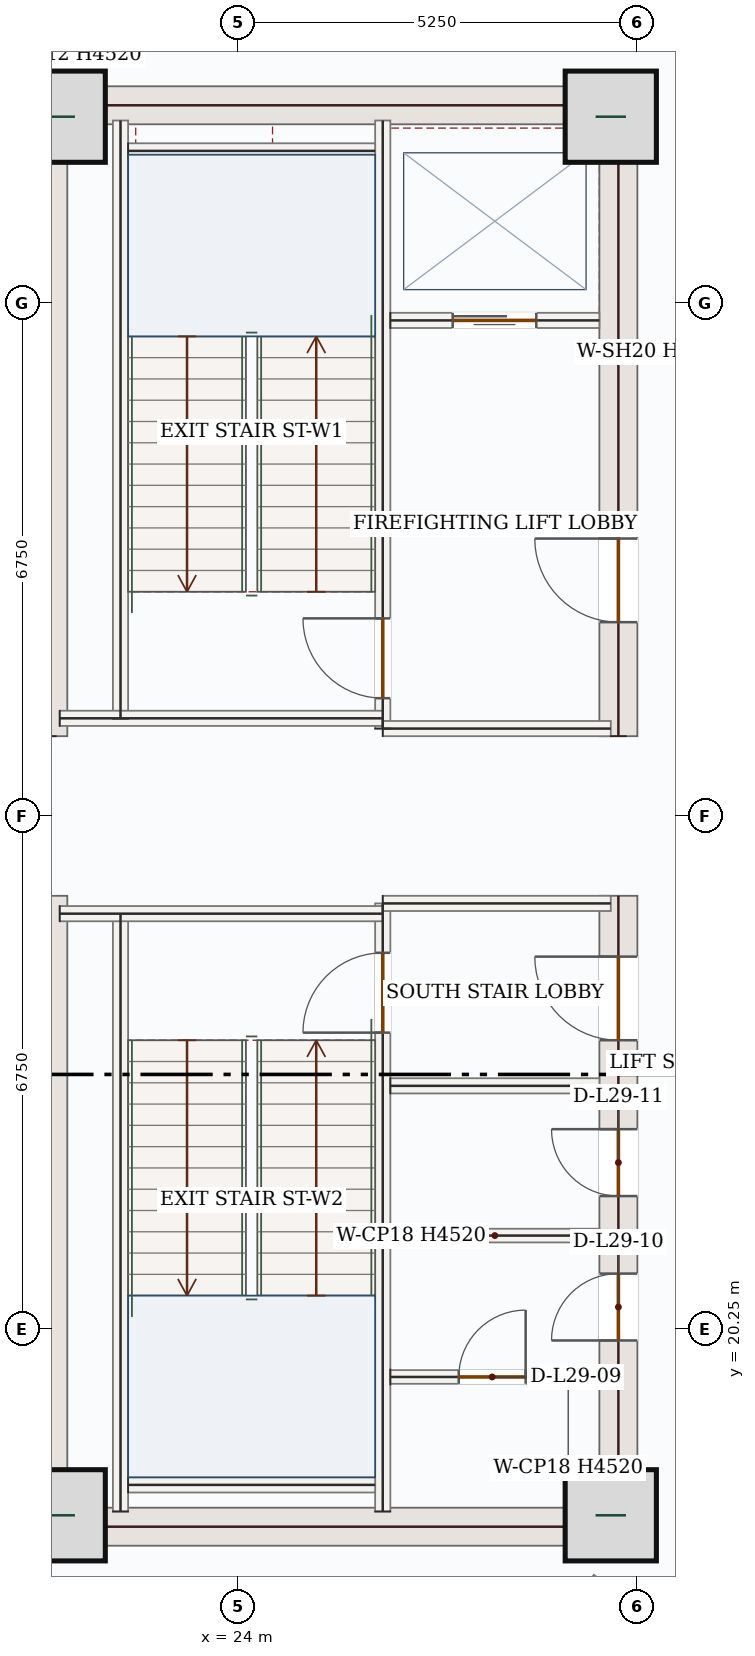
"""IFC4 building model, lengths in metres.
Left out: names, types, materials, properties, quantities, classifications, styles, units other than length and angle.
Written with IfcOpenShell. Run it as: python <this file> out.ifc"""

import sys

from ifc_helpers import new_model, si_unit, direction, frame, frame_2d, origin, origin_2d, place, context, subcontext, project, spatial, rectangle, extrude, source, transform, mapped, element, fill, save


model = new_model("IFC4")
c1 = context("Model", 3, precision=1e-05, world=origin(), true_north=direction((0.0, 1.0)))
c2 = subcontext(c1, "Body", "Model", "MODEL_VIEW")
j1 = project(units=[si_unit("LENGTHUNIT", "METRE"), si_unit("PLANEANGLEUNIT", "RADIAN")], contexts=[c1])
p1 = place(None, origin())
s1 = spatial("IfcSite", under=j1, at=p1, CompositionType="ELEMENT")
p2 = place(p1, origin())
s2 = spatial("IfcBuilding", under=s1, at=p2, CompositionType="ELEMENT")
p3 = place(p2, frame((0.0, 0.0, 130.8)))
s3 = spatial("IfcBuildingStorey", under=s2, at=p3, CompositionType="ELEMENT", Elevation=130.8)
m1 = source(origin(), c2, "Body", "SweptSolid", [
    extrude(rectangle(XDim=8.55, YDim=0.5, at=frame_2d((4.275, 0.0))), origin(), (0.0, 0.0, 1.0), 4.52),
])
for number, where, z_axis, x_axis in (
    (1, (21.5, 17.4, 0.0), (0.0, 0.0, 1.0), (0.0, 1.0, 0.0)),
    (2, (21.5, 28.05, 0.0), (0.0, 0.0, 1.0), (0.0, 1.0, 0.0)),
):
    element("IfcWall", number, at=place(p3, frame(where, z_axis=z_axis, x_axis=x_axis)), inside=s3, PredefinedType="SHEAR", context=c2, shape_type="MappedRepresentation", body=[
        mapped(m1, transform((0.0, 0.0, 0.0), x_axis=(1.0, 0.0, 0.0), y_axis=(0.0, 1.0, 0.0), z_axis=(0.0, 0.0, 1.0), scale=1.0)),
    ])
p4 = place(p3, frame((29.0, 17.4, 0.0), z_axis=(0.0, 0.0, 1.0), x_axis=(0.0, 1.0, 0.0)))
e3 = element("IfcWall", 3, at=p4, inside=s3, PredefinedType="SHEAR", context=c2, shape_type="SweptSolid", body=[
    extrude(rectangle(XDim=8.55, YDim=0.5, at=frame_2d((4.275, 0.0))), origin(), (0.0, 0.0, 1.0), 4.52),
])
p5 = place(p4, frame((6.65, 0.0, 0.0)))
e4 = element("IfcOpeningElement", 4, at=p5, cuts=e3, PredefinedType="OPENING", context=c2, shape_type="SweptSolid", body=[
    extrude(rectangle(XDim=1.1, YDim=2.2, at=frame_2d((0.55, 1.1))), frame((0.0, 0.26, 0.0), z_axis=(0.0, -1.0, 0.0), x_axis=(1.0, 0.0, 0.0)), (0.0, 0.0, 1.0), 0.52),
])
p6 = place(p4, frame((2.7, 0.0, 0.0)))
e5 = element("IfcOpeningElement", 5, at=p6, cuts=e3, PredefinedType="OPENING", context=c2, shape_type="SweptSolid", body=[
    extrude(rectangle(XDim=0.88, YDim=2.1, at=frame_2d((0.44, 1.05))), frame((0.0, 0.26, 0.0), z_axis=(0.0, -1.0, 0.0), x_axis=(1.0, 0.0, 0.0)), (0.0, 0.0, 1.0), 0.52),
])
p7 = place(p4, frame((4.6, 0.0, 0.0)))
e6 = element("IfcOpeningElement", 6, at=p7, cuts=e3, PredefinedType="OPENING", context=c2, shape_type="SweptSolid", body=[
    extrude(rectangle(XDim=0.88, YDim=2.1, at=frame_2d((0.44, 1.05))), frame((0.0, 0.26, 0.0), z_axis=(0.0, -1.0, 0.0), x_axis=(1.0, 0.0, 0.0)), (0.0, 0.0, 1.0), 0.52),
])
p8 = place(p3, frame((29.0, 28.05, 0.0), z_axis=(0.0, 0.0, 1.0), x_axis=(0.0, 1.0, 0.0)))
e7 = element("IfcWall", 7, at=p8, inside=s3, PredefinedType="SHEAR", context=c2, shape_type="SweptSolid", body=[
    extrude(rectangle(XDim=8.55, YDim=0.5, at=frame_2d((4.275, 0.0))), origin(), (0.0, 0.0, 1.0), 4.52),
])
p9 = place(p8, frame((1.5, 0.0, 0.0)))
e8 = element("IfcOpeningElement", 8, at=p9, cuts=e7, PredefinedType="OPENING", context=c2, shape_type="SweptSolid", body=[
    extrude(rectangle(XDim=1.1, YDim=2.2, at=frame_2d((0.55, 1.1))), frame((0.0, 0.26, 0.0), z_axis=(0.0, -1.0, 0.0), x_axis=(1.0, 0.0, 0.0)), (0.0, 0.0, 1.0), 0.52),
])
m2 = source(origin(), c2, "Body", "SweptSolid", [
    extrude(rectangle(XDim=7.0, YDim=0.5, at=frame_2d((3.5, 0.0))), origin(), (0.0, 0.0, 1.0), 4.52),
])
for number, where, z_axis, x_axis in (
    (9, (21.75, 17.65, 0.0), (0.0, 0.0, 1.0), (1.0, 0.0, 0.0)),
    (10, (21.75, 36.35, 0.0), (0.0, 0.0, 1.0), (1.0, 0.0, 0.0)),
):
    element("IfcWall", number, at=place(p3, frame(where, z_axis=z_axis, x_axis=x_axis)), inside=s3, PredefinedType="SHEAR", context=c2, shape_type="MappedRepresentation", body=[
        mapped(m2, transform((0.0, 0.0, 0.0), x_axis=(1.0, 0.0, 0.0), y_axis=(0.0, 1.0, 0.0), z_axis=(0.0, 0.0, 1.0), scale=1.0)),
    ])
m3 = source(origin(), c2, "Body", "SweptSolid", [
    extrude(rectangle(XDim=1.2, YDim=1.2, at=origin_2d()), origin(), (0.0, 0.0, 1.0), 4.8),
])
for number, where, z_axis, x_axis in (
    (11, (21.65, 17.8, 0.0), (0.0, 0.0, 1.0), (1.0, 0.0, 0.0)),
    (12, (28.9, 17.8, 0.0), (0.0, 0.0, 1.0), (1.0, 0.0, 0.0)),
    (13, (21.65, 36.2, 0.0), (0.0, 0.0, 1.0), (1.0, 0.0, 0.0)),
    (14, (28.9, 36.2, 0.0), (0.0, 0.0, 1.0), (1.0, 0.0, 0.0)),
):
    element("IfcColumn", number, at=place(p3, frame(where, z_axis=z_axis, x_axis=x_axis)), inside=s3, PredefinedType="COLUMN", context=c2, shape_type="MappedRepresentation", body=[
        mapped(m3, transform((0.0, 0.0, 0.0), x_axis=(1.0, 0.0, 0.0), y_axis=(0.0, 1.0, 0.0), z_axis=(0.0, 0.0, 1.0), scale=1.0)),
    ])
p10 = place(p3, frame((22.658, 14.74, 0.0), z_axis=(0.0, 0.0, 1.0), x_axis=(-0.707106781187, 0.707106781187, 0.0)))
e15 = element("IfcWall", 15, at=p10, inside=s3, PredefinedType="SOLIDWALL", context=c2, shape_type="SweptSolid", body=[
    extrude(rectangle(XDim=4.11, YDim=0.28, at=frame_2d((2.055, 0.0))), origin(), (0.0, 0.0, 1.0), 4.52),
])
p11 = place(p10, frame((1.155, 0.0, 0.85)))
e16 = element("IfcOpeningElement", 16, at=p11, cuts=e15, PredefinedType="OPENING", context=c2, shape_type="SweptSolid", body=[
    extrude(rectangle(XDim=1.8, YDim=1.75, at=frame_2d((0.9, 0.875))), frame((0.0, 0.15, 0.0), z_axis=(0.0, -1.0, 0.0), x_axis=(1.0, 0.0, 0.0)), (0.0, 0.0, 1.0), 0.3),
])
m4 = source(origin(), c2, "Body", "SweptSolid", [
    extrude(rectangle(XDim=5.258, YDim=0.28, at=frame_2d((2.629, 0.0))), origin(), (0.0, 0.0, 1.0), 4.52),
])
p12 = place(p3, frame((18.94, 35.542, 0.0), z_axis=(0.0, 0.0, 1.0), x_axis=(0.707106781187, 0.707106781187, 0.0)))
e17 = element("IfcWall", 17, at=p12, inside=s3, PredefinedType="SOLIDWALL", context=c2, shape_type="MappedRepresentation", body=[
    mapped(m4, transform((0.0, 0.0, 0.0), x_axis=(1.0, 0.0, 0.0), y_axis=(0.0, 1.0, 0.0), z_axis=(0.0, 0.0, 1.0), scale=1.0)),
])
m5 = source(origin(), c2, "Body", "SweptSolid", [
    extrude(rectangle(XDim=7.87, YDim=0.2, at=frame_2d((3.935, 0.0))), origin(), (0.0, 0.0, 1.0), 4.52),
])
for number, where, z_axis, x_axis in (
    (18, (22.45, 17.85, 0.0), (0.0, 0.0, 1.0), (0.0, 1.0, 0.0)),
    (19, (22.45, 28.28, 0.0), (0.0, 0.0, 1.0), (0.0, 1.0, 0.0)),
):
    element("IfcWall", number, at=place(p3, frame(where, z_axis=z_axis, x_axis=x_axis)), inside=s3, PredefinedType="SOLIDWALL", context=c2, shape_type="MappedRepresentation", body=[
        mapped(m5, transform((0.0, 0.0, 0.0), x_axis=(1.0, 0.0, 0.0), y_axis=(0.0, 1.0, 0.0), z_axis=(0.0, 0.0, 1.0), scale=1.0)),
    ])
p13 = place(p3, frame((25.9, 17.85, 0.0), z_axis=(0.0, 0.0, 1.0), x_axis=(0.0, 1.0, 0.0)))
e20 = element("IfcWall", 20, at=p13, inside=s3, PredefinedType="SOLIDWALL", context=c2, shape_type="SweptSolid", body=[
    extrude(rectangle(XDim=8.0, YDim=0.2, at=frame_2d((4.0, 0.0))), origin(), (0.0, 0.0, 1.0), 4.52),
])
p14 = place(p13, frame((6.3, 0.0, 0.0)))
e21 = element("IfcOpeningElement", 21, at=p14, cuts=e20, PredefinedType="OPENING", context=c2, shape_type="SweptSolid", body=[
    extrude(rectangle(XDim=1.05, YDim=2.15, at=frame_2d((0.525, 1.075))), frame((0.0, 0.11, 0.0), z_axis=(0.0, -1.0, 0.0), x_axis=(1.0, 0.0, 0.0)), (0.0, 0.0, 1.0), 0.22),
])
p15 = place(p3, frame((25.9, 28.15, 0.0), z_axis=(0.0, 0.0, 1.0), x_axis=(0.0, 1.0, 0.0)))
e22 = element("IfcWall", 22, at=p15, inside=s3, PredefinedType="SOLIDWALL", context=c2, shape_type="SweptSolid", body=[
    extrude(rectangle(XDim=8.0, YDim=0.2, at=frame_2d((4.0, 0.0))), origin(), (0.0, 0.0, 1.0), 4.52),
])
p16 = place(p15, frame((0.4, 0.0, 0.0)))
e23 = element("IfcOpeningElement", 23, at=p16, cuts=e22, PredefinedType="OPENING", context=c2, shape_type="SweptSolid", body=[
    extrude(rectangle(XDim=1.05, YDim=2.15, at=frame_2d((0.525, 1.075))), frame((0.0, 0.11, 0.0), z_axis=(0.0, -1.0, 0.0), x_axis=(1.0, 0.0, 0.0)), (0.0, 0.0, 1.0), 0.22),
])
m6 = source(origin(), c2, "Body", "SweptSolid", [
    extrude(rectangle(XDim=4.25, YDim=0.2, at=frame_2d((2.125, 0.0))), origin(), (0.0, 0.0, 1.0), 4.52),
])
p17 = place(p3, frame((21.65, 25.715, 0.0), z_axis=(0.0, 0.0, 1.0), x_axis=(1.0, 0.0, 0.0)))
e24 = element("IfcWall", 24, at=p17, inside=s3, PredefinedType="SOLIDWALL", context=c2, shape_type="MappedRepresentation", body=[
    mapped(m6, transform((0.0, 0.0, 0.0), x_axis=(1.0, 0.0, 0.0), y_axis=(0.0, 1.0, 0.0), z_axis=(0.0, 0.0, 1.0), scale=1.0)),
])
m7 = source(origin(), c2, "Body", "SweptSolid", [
    extrude(rectangle(XDim=3.0, YDim=0.2, at=frame_2d((1.5, 0.0))), origin(), (0.0, 0.0, 1.0), 4.52),
])
p18 = place(p3, frame((25.9, 25.85, 0.0), z_axis=(0.0, 0.0, 1.0), x_axis=(1.0, 0.0, 0.0)))
e25 = element("IfcWall", 25, at=p18, inside=s3, PredefinedType="SOLIDWALL", context=c2, shape_type="MappedRepresentation", body=[
    mapped(m7, transform((0.0, 0.0, 0.0), x_axis=(1.0, 0.0, 0.0), y_axis=(0.0, 1.0, 0.0), z_axis=(0.0, 0.0, 1.0), scale=1.0)),
])
p19 = place(p3, frame((21.65, 28.285, 0.0), z_axis=(0.0, 0.0, 1.0), x_axis=(1.0, 0.0, 0.0)))
e26 = element("IfcWall", 26, at=p19, inside=s3, PredefinedType="SOLIDWALL", context=c2, shape_type="MappedRepresentation", body=[
    mapped(m6, transform((0.0, 0.0, 0.0), x_axis=(1.0, 0.0, 0.0), y_axis=(0.0, 1.0, 0.0), z_axis=(0.0, 0.0, 1.0), scale=1.0)),
])
p20 = place(p3, frame((25.9, 28.15, 0.0), z_axis=(0.0, 0.0, 1.0), x_axis=(1.0, 0.0, 0.0)))
e27 = element("IfcWall", 27, at=p20, inside=s3, PredefinedType="SOLIDWALL", context=c2, shape_type="MappedRepresentation", body=[
    mapped(m7, transform((0.0, 0.0, 0.0), x_axis=(1.0, 0.0, 0.0), y_axis=(0.0, 1.0, 0.0), z_axis=(0.0, 0.0, 1.0), scale=1.0)),
])
m8 = source(origin(), c2, "Body", "SweptSolid", [
    extrude(rectangle(XDim=3.25, YDim=0.2, at=frame_2d((1.625, 0.0))), origin(), (0.0, 0.0, 1.0), 4.52),
])
for number, where, z_axis, x_axis in (
    (28, (22.55, 35.75, 0.0), (0.0, 0.0, 1.0), (1.0, 0.0, 0.0)),
    (29, (22.55, 18.2, 0.0), (0.0, 0.0, 1.0), (1.0, 0.0, 0.0)),
):
    element("IfcWall", number, at=place(p3, frame(where, z_axis=z_axis, x_axis=x_axis)), inside=s3, PredefinedType="SOLIDWALL", context=c2, shape_type="MappedRepresentation", body=[
        mapped(m8, transform((0.0, 0.0, 0.0), x_axis=(1.0, 0.0, 0.0), y_axis=(0.0, 1.0, 0.0), z_axis=(0.0, 0.0, 1.0), scale=1.0)),
    ])
p21 = place(p3, frame((26.0, 33.52, 0.0), z_axis=(0.0, 0.0, 1.0), x_axis=(1.0, 0.0, 0.0)))
e30 = element("IfcWall", 30, at=p21, inside=s3, PredefinedType="SOLIDWALL", context=c2, shape_type="SweptSolid", body=[
    extrude(rectangle(XDim=2.75, YDim=0.2, at=frame_2d((1.375, 0.0))), origin(), (0.0, 0.0, 1.0), 4.52),
])
p22 = place(p21, frame((0.82, 0.0, 0.0)))
e31 = element("IfcOpeningElement", 31, at=p22, cuts=e30, PredefinedType="OPENING", context=c2, shape_type="SweptSolid", body=[
    extrude(rectangle(XDim=1.1, YDim=2.15, at=frame_2d((0.55, 1.075))), frame((0.0, 0.11, 0.0), z_axis=(0.0, -1.0, 0.0), x_axis=(1.0, 0.0, 0.0)), (0.0, 0.0, 1.0), 0.22),
])
m9 = source(origin(), c2, "Body", "SweptSolid", [
    extrude(rectangle(XDim=2.75, YDim=0.2, at=frame_2d((1.375, 0.0))), origin(), (0.0, 0.0, 1.0), 4.52),
])
p23 = place(p3, frame((26.0, 23.45, 0.0), z_axis=(0.0, 0.0, 1.0), x_axis=(1.0, 0.0, 0.0)))
e32 = element("IfcWall", 32, at=p23, inside=s3, PredefinedType="SOLIDWALL", context=c2, shape_type="MappedRepresentation", body=[
    mapped(m9, transform((0.0, 0.0, 0.0), x_axis=(1.0, 0.0, 0.0), y_axis=(0.0, 1.0, 0.0), z_axis=(0.0, 0.0, 1.0), scale=1.0)),
])
p24 = place(p3, frame((26.0, 19.62, 0.0), z_axis=(0.0, 0.0, 1.0), x_axis=(1.0, 0.0, 0.0)))
e33 = element("IfcWall", 33, at=p24, inside=s3, PredefinedType="PARTITIONING", context=c2, shape_type="SweptSolid", body=[
    extrude(rectangle(XDim=2.75, YDim=0.18, at=frame_2d((1.375, 0.0))), origin(), (0.0, 0.0, 1.0), 4.52),
])
p25 = place(p24, frame((0.9, 0.0, 0.0)))
e34 = element("IfcOpeningElement", 34, at=p25, cuts=e33, PredefinedType="OPENING", context=c2, shape_type="SweptSolid", body=[
    extrude(rectangle(XDim=0.88, YDim=2.1, at=frame_2d((0.44, 1.05))), frame((0.0, 0.1, 0.0), z_axis=(0.0, -1.0, 0.0), x_axis=(1.0, 0.0, 0.0)), (0.0, 0.0, 1.0), 0.2),
])
m10 = source(origin(), c2, "Body", "SweptSolid", [
    extrude(rectangle(XDim=2.75, YDim=0.18, at=frame_2d((1.375, 0.0))), origin(), (0.0, 0.0, 1.0), 4.52),
])
p26 = place(p3, frame((26.0, 21.48, 0.0), z_axis=(0.0, 0.0, 1.0), x_axis=(1.0, 0.0, 0.0)))
e35 = element("IfcWall", 35, at=p26, inside=s3, PredefinedType="PARTITIONING", context=c2, shape_type="MappedRepresentation", body=[
    mapped(m10, transform((0.0, 0.0, 0.0), x_axis=(1.0, 0.0, 0.0), y_axis=(0.0, 1.0, 0.0), z_axis=(0.0, 0.0, 1.0), scale=1.0)),
])
m11 = source(origin(), c2, "Body", "SweptSolid", [
    extrude(rectangle(XDim=2.594, YDim=0.125, at=frame_2d((1.297, 0.0))), origin(), (0.0, 0.0, 1.0), 4.52),
])
p27 = place(p3, frame((27.197, 14.885, 0.0), z_axis=(0.0, 0.0, 1.0), x_axis=(0.589910415932, 0.807468699811, 0.0)))
e36 = element("IfcWall", 36, at=p27, inside=s3, PredefinedType="PARTITIONING", context=c2, shape_type="MappedRepresentation", body=[
    mapped(m11, transform((0.0, 0.0, 0.0), x_axis=(1.0, 0.0, 0.0), y_axis=(0.0, 1.0, 0.0), z_axis=(0.0, 0.0, 1.0), scale=1.0)),
])
m12 = source(origin(), c2, "Body", "SweptSolid", [
    extrude(rectangle(XDim=1.142, YDim=0.125, at=frame_2d((0.571, 0.0))), origin(), (0.0, 0.0, 1.0), 4.52),
])
p28 = place(p3, frame((21.297, 37.694, 0.0), z_axis=(0.0, 0.0, 1.0), x_axis=(0.807579073196, -0.589759307291, 0.0)))
e37 = element("IfcWall", 37, at=p28, inside=s3, PredefinedType="PARTITIONING", context=c2, shape_type="MappedRepresentation", body=[
    mapped(m12, transform((0.0, 0.0, 0.0), x_axis=(1.0, 0.0, 0.0), y_axis=(0.0, 1.0, 0.0), z_axis=(0.0, 0.0, 1.0), scale=1.0)),
])
m13 = source(origin(), c2, "Body", "SweptSolid", [
    extrude(rectangle(XDim=1.05, YDim=2.15, at=frame_2d((0.525, 1.075))), frame((0.0, 0.025, 0.0), z_axis=(0.0, -1.0, 0.0), x_axis=(1.0, 0.0, 0.0)), (0.0, 0.0, 1.0), 0.05),
])
p29 = place(p16, origin())
e38 = element("IfcDoor", 38, at=p29, inside=s3, OperationType="SINGLE_SWING_RIGHT", PredefinedType="DOOR", context=c2, shape_type="MappedRepresentation", body=[
    mapped(m13, transform((0.0, 0.0, 0.0), x_axis=(1.0, 0.0, 0.0), y_axis=(0.0, 1.0, 0.0), z_axis=(0.0, 0.0, 1.0), scale=1.0)),
])
fill(e23, e38)
p30 = place(p14, origin())
e39 = element("IfcDoor", 39, at=p30, inside=s3, OperationType="SINGLE_SWING_LEFT", PredefinedType="DOOR", context=c2, shape_type="MappedRepresentation", body=[
    mapped(m13, transform((0.0, 0.0, 0.0), x_axis=(1.0, 0.0, 0.0), y_axis=(0.0, 1.0, 0.0), z_axis=(0.0, 0.0, 1.0), scale=1.0)),
])
fill(e21, e39)
m14 = source(origin(), c2, "Body", "SweptSolid", [
    extrude(rectangle(XDim=1.1, YDim=2.15, at=frame_2d((0.55, 1.075))), frame((0.0, 0.025, 0.0), z_axis=(0.0, -1.0, 0.0), x_axis=(1.0, 0.0, 0.0)), (0.0, 0.0, 1.0), 0.05),
])
p31 = place(p22, origin())
e40 = element("IfcDoor", 40, at=p31, inside=s3, OperationType="DOUBLE_DOOR_SLIDING", PredefinedType="DOOR", context=c2, shape_type="MappedRepresentation", body=[
    mapped(m14, transform((0.0, 0.0, 0.0), x_axis=(1.0, 0.0, 0.0), y_axis=(0.0, 1.0, 0.0), z_axis=(0.0, 0.0, 1.0), scale=1.0)),
])
fill(e31, e40)
m15 = source(origin(), c2, "Body", "SweptSolid", [
    extrude(rectangle(XDim=1.1, YDim=2.2, at=frame_2d((0.55, 1.1))), frame((0.0, 0.025, 0.0), z_axis=(0.0, -1.0, 0.0), x_axis=(1.0, 0.0, 0.0)), (0.0, 0.0, 1.0), 0.05),
])
p32 = place(p9, origin())
e41 = element("IfcDoor", 41, at=p32, inside=s3, OperationType="SINGLE_SWING_RIGHT", PredefinedType="DOOR", context=c2, shape_type="MappedRepresentation", body=[
    mapped(m15, transform((0.0, 0.0, 0.0), x_axis=(1.0, 0.0, 0.0), y_axis=(0.0, 1.0, 0.0), z_axis=(0.0, 0.0, 1.0), scale=1.0)),
])
fill(e8, e41)
p33 = place(p5, origin())
e42 = element("IfcDoor", 42, at=p33, inside=s3, OperationType="SINGLE_SWING_RIGHT", PredefinedType="DOOR", context=c2, shape_type="MappedRepresentation", body=[
    mapped(m15, transform((0.0, 0.0, 0.0), x_axis=(1.0, 0.0, 0.0), y_axis=(0.0, 1.0, 0.0), z_axis=(0.0, 0.0, 1.0), scale=1.0)),
])
fill(e4, e42)
m16 = source(origin(), c2, "Body", "SweptSolid", [
    extrude(rectangle(XDim=0.88, YDim=2.1, at=frame_2d((0.44, 1.05))), frame((0.0, 0.025, 0.0), z_axis=(0.0, -1.0, 0.0), x_axis=(1.0, 0.0, 0.0)), (0.0, 0.0, 1.0), 0.05),
])
p34 = place(p25, origin())
e43 = element("IfcDoor", 43, at=p34, inside=s3, OperationType="SINGLE_SWING_RIGHT", PredefinedType="DOOR", context=c2, shape_type="MappedRepresentation", body=[
    mapped(m16, transform((0.0, 0.0, 0.0), x_axis=(1.0, 0.0, 0.0), y_axis=(0.0, 1.0, 0.0), z_axis=(0.0, 0.0, 1.0), scale=1.0)),
])
fill(e34, e43)
p35 = place(p6, origin())
e44 = element("IfcDoor", 44, at=p35, inside=s3, OperationType="SINGLE_SWING_LEFT", PredefinedType="DOOR", context=c2, shape_type="MappedRepresentation", body=[
    mapped(m16, transform((0.0, 0.0, 0.0), x_axis=(1.0, 0.0, 0.0), y_axis=(0.0, 1.0, 0.0), z_axis=(0.0, 0.0, 1.0), scale=1.0)),
])
fill(e5, e44)
p36 = place(p7, origin())
e45 = element("IfcDoor", 45, at=p36, inside=s3, OperationType="SINGLE_SWING_RIGHT", PredefinedType="DOOR", context=c2, shape_type="MappedRepresentation", body=[
    mapped(m16, transform((0.0, 0.0, 0.0), x_axis=(1.0, 0.0, 0.0), y_axis=(0.0, 1.0, 0.0), z_axis=(0.0, 0.0, 1.0), scale=1.0)),
])
fill(e6, e45)
save(model, sys.argv[1])
